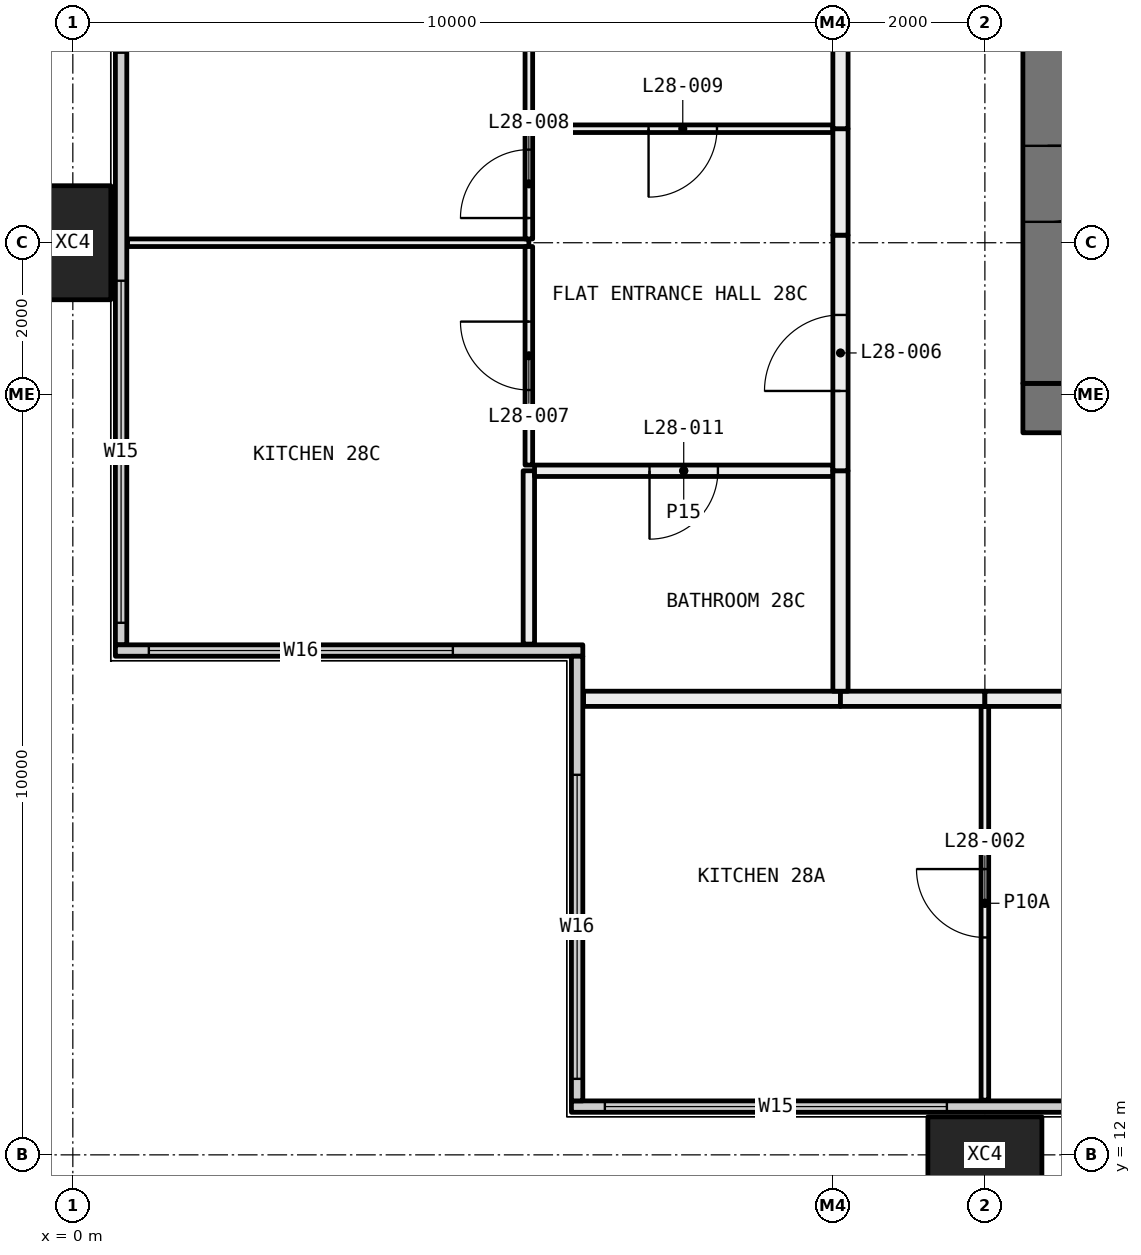
"""IFC4 building model, lengths in metres.
Left out: names, types, materials, properties, quantities, classifications, styles, units other than length and angle.
Written with IfcOpenShell. Run it as: python <this file> out.ifc"""

import sys

from ifc_helpers import new_model, si_unit, direction, frame, frame_2d, origin, origin_2d, place, context, subcontext, project, spatial, rectangle, hollow_rectangle, extrude, element, fill, save


model = new_model("IFC4")
c1 = context("Model", 3, precision=1e-05, world=origin(), true_north=direction((0.0, 1.0)))
c2 = subcontext(c1, "Body", "Model", "MODEL_VIEW")
j1 = project(units=[si_unit("LENGTHUNIT", "METRE"), si_unit("PLANEANGLEUNIT", "RADIAN")], contexts=[c1])
p1 = place(None, origin())
s1 = spatial("IfcSite", under=j1, at=p1, CompositionType="ELEMENT")
p2 = place(p1, origin())
s2 = spatial("IfcBuilding", under=s1, at=p2, CompositionType="ELEMENT")
p3 = place(p2, frame((0.0, 0.0, 110.4)))
s3 = spatial("IfcBuildingStorey", under=s2, at=p3, CompositionType="ELEMENT", Elevation=110.4)
for number, where, z_axis, x_axis in (
    (1, (0.0, 24.0, -0.4), (0.0, 0.0, 1.0), (0.0, 1.0, 0.0)),
    (2, (12.0, 12.0, -0.4), (0.0, 0.0, 1.0), (1.0, 0.0, 0.0)),
):
    element("IfcColumn", number, at=place(p3, frame(where, z_axis=z_axis, x_axis=x_axis)), inside=s3, PredefinedType="COLUMN", context=c2, shape_type="SweptSolid", body=[
        extrude(hollow_rectangle(XDim=1.5, YDim=1.0, WallThickness=0.06, at=origin_2d()), origin(), (0.0, 0.0, 1.0), 3.45),
    ])
p4 = place(p3, frame((6.56, 12.635, 0.0), z_axis=(0.0, 0.0, 1.0), x_axis=(1.0, 0.0, 0.0)))
e3 = element("IfcWall", 3, at=p4, inside=s3, PredefinedType="ELEMENTEDWALL", context=c2, shape_type="SweptSolid", body=[
    extrude(rectangle(XDim=58.88, YDim=0.15, at=frame_2d((29.44, 0.0))), origin(), (0.0, 0.0, 1.0), 3.05),
])
p5 = place(p4, frame((0.44, 0.0, 0.45)))
e4 = element("IfcOpeningElement", 4, at=p5, cuts=e3, PredefinedType="OPENING", context=c2, shape_type="SweptSolid", body=[
    extrude(rectangle(XDim=4.5, YDim=2.55, at=frame_2d((2.25, 1.275))), frame((0.0, 0.085, 0.0), z_axis=(0.0, -1.0, 0.0), x_axis=(1.0, 0.0, 0.0)), (0.0, 0.0, 1.0), 0.17),
])
p6 = place(p4, frame((7.94, 0.0, 0.45)))
e5 = element("IfcOpeningElement", 5, at=p6, cuts=e3, PredefinedType="OPENING", context=c2, shape_type="SweptSolid", body=[
    extrude(rectangle(XDim=3.0, YDim=2.55, at=frame_2d((1.5, 1.275))), frame((0.0, 0.085, 0.0), z_axis=(0.0, -1.0, 0.0), x_axis=(1.0, 0.0, 0.0)), (0.0, 0.0, 1.0), 0.17),
])
p7 = place(p4, frame((11.94, 0.0, 0.45)))
e6 = element("IfcOpeningElement", 6, at=p7, cuts=e3, PredefinedType="OPENING", context=c2, shape_type="SweptSolid", body=[
    extrude(rectangle(XDim=3.0, YDim=2.55, at=frame_2d((1.5, 1.275))), frame((0.0, 0.085, 0.0), z_axis=(0.0, -1.0, 0.0), x_axis=(1.0, 0.0, 0.0)), (0.0, 0.0, 1.0), 0.17),
])
p8 = place(p4, frame((19.94, 0.0, 0.45)))
e7 = element("IfcOpeningElement", 7, at=p8, cuts=e3, PredefinedType="OPENING", context=c2, shape_type="SweptSolid", body=[
    extrude(rectangle(XDim=3.0, YDim=2.55, at=frame_2d((1.5, 1.275))), frame((0.0, 0.085, 0.0), z_axis=(0.0, -1.0, 0.0), x_axis=(1.0, 0.0, 0.0)), (0.0, 0.0, 1.0), 0.17),
])
p9 = place(p4, frame((23.94, 0.0, 0.45)))
e8 = element("IfcOpeningElement", 8, at=p9, cuts=e3, PredefinedType="OPENING", context=c2, shape_type="SweptSolid", body=[
    extrude(rectangle(XDim=2.0, YDim=2.55, at=frame_2d((1.0, 1.275))), frame((0.0, 0.085, 0.0), z_axis=(0.0, -1.0, 0.0), x_axis=(1.0, 0.0, 0.0)), (0.0, 0.0, 1.0), 0.17),
])
p10 = place(p4, frame((31.94, 0.0, 0.45)))
e9 = element("IfcOpeningElement", 9, at=p10, cuts=e3, PredefinedType="OPENING", context=c2, shape_type="SweptSolid", body=[
    extrude(rectangle(XDim=3.0, YDim=2.55, at=frame_2d((1.5, 1.275))), frame((0.0, 0.085, 0.0), z_axis=(0.0, -1.0, 0.0), x_axis=(1.0, 0.0, 0.0)), (0.0, 0.0, 1.0), 0.17),
])
p11 = place(p4, frame((35.94, 0.0, 0.45)))
e10 = element("IfcOpeningElement", 10, at=p11, cuts=e3, PredefinedType="OPENING", context=c2, shape_type="SweptSolid", body=[
    extrude(rectangle(XDim=3.0, YDim=2.55, at=frame_2d((1.5, 1.275))), frame((0.0, 0.085, 0.0), z_axis=(0.0, -1.0, 0.0), x_axis=(1.0, 0.0, 0.0)), (0.0, 0.0, 1.0), 0.17),
])
p12 = place(p4, frame((43.94, 0.0, 0.45)))
e11 = element("IfcOpeningElement", 11, at=p12, cuts=e3, PredefinedType="OPENING", context=c2, shape_type="SweptSolid", body=[
    extrude(rectangle(XDim=3.0, YDim=2.55, at=frame_2d((1.5, 1.275))), frame((0.0, 0.085, 0.0), z_axis=(0.0, -1.0, 0.0), x_axis=(1.0, 0.0, 0.0)), (0.0, 0.0, 1.0), 0.17),
])
p13 = place(p4, frame((47.94, 0.0, 0.45)))
e12 = element("IfcOpeningElement", 12, at=p13, cuts=e3, PredefinedType="OPENING", context=c2, shape_type="SweptSolid", body=[
    extrude(rectangle(XDim=2.0, YDim=2.55, at=frame_2d((1.0, 1.275))), frame((0.0, 0.085, 0.0), z_axis=(0.0, -1.0, 0.0), x_axis=(1.0, 0.0, 0.0)), (0.0, 0.0, 1.0), 0.17),
])
p14 = place(p4, frame((53.94, 0.0, 0.45)))
e13 = element("IfcOpeningElement", 13, at=p14, cuts=e3, PredefinedType="OPENING", context=c2, shape_type="SweptSolid", body=[
    extrude(rectangle(XDim=4.5, YDim=2.55, at=frame_2d((2.25, 1.275))), frame((0.0, 0.085, 0.0), z_axis=(0.0, -1.0, 0.0), x_axis=(1.0, 0.0, 0.0)), (0.0, 0.0, 1.0), 0.17),
])
p15 = place(p3, frame((0.635, 18.71, 0.0), z_axis=(0.0, 0.0, 1.0), x_axis=(0.0, 1.0, 0.0)))
e14 = element("IfcWall", 14, at=p15, inside=s3, PredefinedType="ELEMENTEDWALL", context=c2, shape_type="SweptSolid", body=[
    extrude(rectangle(XDim=22.58, YDim=0.15, at=frame_2d((11.29, 0.0))), origin(), (0.0, 0.0, 1.0), 3.05),
])
p16 = place(p15, frame((0.29, 0.0, 0.45)))
e15 = element("IfcOpeningElement", 15, at=p16, cuts=e14, PredefinedType="OPENING", context=c2, shape_type="SweptSolid", body=[
    extrude(rectangle(XDim=4.5, YDim=2.55, at=frame_2d((2.25, 1.275))), frame((0.0, 0.085, 0.0), z_axis=(0.0, -1.0, 0.0), x_axis=(1.0, 0.0, 0.0)), (0.0, 0.0, 1.0), 0.17),
])
p17 = place(p15, frame((7.79, 0.0, 0.45)))
e16 = element("IfcOpeningElement", 16, at=p17, cuts=e14, PredefinedType="OPENING", context=c2, shape_type="SweptSolid", body=[
    extrude(rectangle(XDim=3.0, YDim=2.55, at=frame_2d((1.5, 1.275))), frame((0.0, 0.085, 0.0), z_axis=(0.0, -1.0, 0.0), x_axis=(1.0, 0.0, 0.0)), (0.0, 0.0, 1.0), 0.17),
])
p18 = place(p15, frame((11.79, 0.0, 0.45)))
e17 = element("IfcOpeningElement", 17, at=p18, cuts=e14, PredefinedType="OPENING", context=c2, shape_type="SweptSolid", body=[
    extrude(rectangle(XDim=2.0, YDim=2.55, at=frame_2d((1.0, 1.275))), frame((0.0, 0.085, 0.0), z_axis=(0.0, -1.0, 0.0), x_axis=(1.0, 0.0, 0.0)), (0.0, 0.0, 1.0), 0.17),
])
p19 = place(p15, frame((17.79, 0.0, 0.45)))
e18 = element("IfcOpeningElement", 18, at=p19, cuts=e14, PredefinedType="OPENING", context=c2, shape_type="SweptSolid", body=[
    extrude(rectangle(XDim=4.5, YDim=2.55, at=frame_2d((2.25, 1.275))), frame((0.0, 0.085, 0.0), z_axis=(0.0, -1.0, 0.0), x_axis=(1.0, 0.0, 0.0)), (0.0, 0.0, 1.0), 0.17),
])
p20 = place(p3, frame((0.56, 18.635, 0.0), z_axis=(0.0, 0.0, 1.0), x_axis=(1.0, 0.0, 0.0)))
e19 = element("IfcWall", 19, at=p20, inside=s3, PredefinedType="ELEMENTEDWALL", context=c2, shape_type="SweptSolid", body=[
    extrude(rectangle(XDim=6.15, YDim=0.15, at=frame_2d((3.075, 0.0))), origin(), (0.0, 0.0, 1.0), 3.05),
])
p21 = place(p20, frame((0.44, 0.0, 0.45)))
e20 = element("IfcOpeningElement", 20, at=p21, cuts=e19, PredefinedType="OPENING", context=c2, shape_type="SweptSolid", body=[
    extrude(rectangle(XDim=4.0, YDim=2.55, at=frame_2d((2.0, 1.275))), frame((0.0, 0.085, 0.0), z_axis=(0.0, -1.0, 0.0), x_axis=(1.0, 0.0, 0.0)), (0.0, 0.0, 1.0), 0.17),
])
p22 = place(p3, frame((6.635, 12.71, 0.0), z_axis=(0.0, 0.0, 1.0), x_axis=(0.0, 1.0, 0.0)))
e21 = element("IfcWall", 21, at=p22, inside=s3, PredefinedType="ELEMENTEDWALL", context=c2, shape_type="SweptSolid", body=[
    extrude(rectangle(XDim=5.85, YDim=0.15, at=frame_2d((2.925, 0.0))), origin(), (0.0, 0.0, 1.0), 3.05),
])
p23 = place(p22, frame((0.29, 0.0, 0.45)))
e22 = element("IfcOpeningElement", 22, at=p23, cuts=e21, PredefinedType="OPENING", context=c2, shape_type="SweptSolid", body=[
    extrude(rectangle(XDim=4.0, YDim=2.55, at=frame_2d((2.0, 1.275))), frame((0.0, 0.085, 0.0), z_axis=(0.0, -1.0, 0.0), x_axis=(1.0, 0.0, 0.0)), (0.0, 0.0, 1.0), 0.17),
])
p24 = place(p3, frame((12.0, 12.72, 0.0), z_axis=(0.0, 0.0, 1.0), x_axis=(0.0, 1.0, 0.0)))
e23 = element("IfcWall", 23, at=p24, inside=s3, PredefinedType="PARTITIONING", context=c2, shape_type="SweptSolid", body=[
    extrude(rectangle(XDim=5.18, YDim=0.1, at=frame_2d((2.59, 0.0))), origin(), (0.0, 0.0, 1.0), 3.05),
])
p25 = place(p24, frame((2.14, 0.0, 0.0)))
e24 = element("IfcOpeningElement", 24, at=p25, cuts=e23, PredefinedType="OPENING", context=c2, shape_type="SweptSolid", body=[
    extrude(rectangle(XDim=0.9, YDim=2.1, at=frame_2d((0.45, 1.05))), frame((0.0, 0.06, 0.0), z_axis=(0.0, -1.0, 0.0), x_axis=(1.0, 0.0, 0.0)), (0.0, 0.0, 1.0), 0.12),
])
p26 = place(p3, frame((10.1, 18.0, 0.0), z_axis=(0.0, 0.0, 1.0), x_axis=(-1.0, 0.0, 0.0)))
e25 = element("IfcWall", 25, at=p26, inside=s3, PredefinedType="PARTITIONING", context=c2, shape_type="SweptSolid", body=[
    extrude(rectangle(XDim=3.38, YDim=0.2, at=frame_2d((1.69, 0.0))), origin(), (0.0, 0.0, 1.0), 3.05),
])
p27 = place(p3, frame((12.0, 18.0, 0.0), z_axis=(0.0, 0.0, 1.0), x_axis=(-1.0, 0.0, 0.0)))
e26 = element("IfcWall", 26, at=p27, inside=s3, PredefinedType="PARTITIONING", context=c2, shape_type="SweptSolid", body=[
    extrude(rectangle(XDim=1.9, YDim=0.2, at=frame_2d((0.95, 0.0))), origin(), (0.0, 0.0, 1.0), 3.05),
])
p28 = place(p3, frame((18.0, 18.0, 0.0), z_axis=(0.0, 0.0, 1.0), x_axis=(-1.0, 0.0, 0.0)))
e27 = element("IfcWall", 27, at=p28, inside=s3, PredefinedType="PARTITIONING", context=c2, shape_type="SweptSolid", body=[
    extrude(rectangle(XDim=6.0, YDim=0.2, at=frame_2d((3.0, 0.0))), origin(), (0.0, 0.0, 1.0), 3.05),
])
p29 = place(p28, frame((2.5, 0.0, 0.0)))
e28 = element("IfcOpeningElement", 28, at=p29, cuts=e27, PredefinedType="OPENING", context=c2, shape_type="SweptSolid", body=[
    extrude(rectangle(XDim=1.0, YDim=2.1, at=frame_2d((0.5, 1.05))), frame((0.0, 0.11, 0.0), z_axis=(0.0, -1.0, 0.0), x_axis=(1.0, 0.0, 0.0)), (0.0, 0.0, 1.0), 0.22),
])
p30 = place(p3, frame((6.0, 24.0, 0.0), z_axis=(0.0, 0.0, 1.0), x_axis=(-1.0, 0.0, 0.0)))
e29 = element("IfcWall", 29, at=p30, inside=s3, PredefinedType="PARTITIONING", context=c2, shape_type="SweptSolid", body=[
    extrude(rectangle(XDim=5.28, YDim=0.1, at=frame_2d((2.64, 0.0))), origin(), (0.0, 0.0, 1.0), 2.45),
])
p31 = place(p3, frame((6.0, 18.72, 0.0), z_axis=(0.0, 0.0, 1.0), x_axis=(0.0, 1.0, 0.0)))
e30 = element("IfcWall", 30, at=p31, inside=s3, PredefinedType="PARTITIONING", context=c2, shape_type="SweptSolid", body=[
    extrude(rectangle(XDim=2.28, YDim=0.15, at=frame_2d((1.14, 0.0))), origin(), (0.0, 0.0, 1.0), 3.05),
])
p32 = place(p3, frame((6.0, 21.075, 0.0), z_axis=(0.0, 0.0, 1.0), x_axis=(0.0, 1.0, 0.0)))
e31 = element("IfcWall", 31, at=p32, inside=s3, PredefinedType="PARTITIONING", context=c2, shape_type="SweptSolid", body=[
    extrude(rectangle(XDim=2.875, YDim=0.1, at=frame_2d((1.438, 0.0))), origin(), (0.0, 0.0, 1.0), 2.45),
])
p33 = place(p32, frame((0.988, 0.0, 0.0)))
e32 = element("IfcOpeningElement", 32, at=p33, cuts=e31, PredefinedType="OPENING", context=c2, shape_type="SweptSolid", body=[
    extrude(rectangle(XDim=0.9, YDim=2.1, at=frame_2d((0.45, 1.05))), frame((0.0, 0.06, 0.0), z_axis=(0.0, -1.0, 0.0), x_axis=(1.0, 0.0, 0.0)), (0.0, 0.0, 1.0), 0.12),
])
p34 = place(p3, frame((6.0, 24.05, 0.0), z_axis=(0.0, 0.0, 1.0), x_axis=(0.0, 1.0, 0.0)))
e33 = element("IfcWall", 33, at=p34, inside=s3, PredefinedType="PARTITIONING", context=c2, shape_type="SweptSolid", body=[
    extrude(rectangle(XDim=1.45, YDim=0.1, at=frame_2d((0.725, 0.0))), origin(), (0.0, 0.0, 1.0), 2.45),
])
p35 = place(p34, frame((0.275, 0.0, 0.0)))
e34 = element("IfcOpeningElement", 34, at=p35, cuts=e33, PredefinedType="OPENING", context=c2, shape_type="SweptSolid", body=[
    extrude(rectangle(XDim=0.9, YDim=2.1, at=frame_2d((0.45, 1.05))), frame((0.0, 0.06, 0.0), z_axis=(0.0, -1.0, 0.0), x_axis=(1.0, 0.0, 0.0)), (0.0, 0.0, 1.0), 0.12),
])
p36 = place(p3, frame((6.0, 25.5, 0.0), z_axis=(0.0, 0.0, 1.0), x_axis=(0.0, 1.0, 0.0)))
e35 = element("IfcWall", 35, at=p36, inside=s3, PredefinedType="PARTITIONING", context=c2, shape_type="SweptSolid", body=[
    extrude(rectangle(XDim=10.45, YDim=0.1, at=frame_2d((5.225, 0.0))), origin(), (0.0, 0.0, 1.0), 2.45),
])
p37 = place(p3, frame((10.0, 21.0, 0.0), z_axis=(0.0, 0.0, 1.0), x_axis=(-1.0, 0.0, 0.0)))
e36 = element("IfcWall", 36, at=p37, inside=s3, PredefinedType="PARTITIONING", context=c2, shape_type="SweptSolid", body=[
    extrude(rectangle(XDim=3.925, YDim=0.15, at=frame_2d((1.962, 0.0))), origin(), (0.0, 0.0, 1.0), 3.05),
])
p38 = place(p37, frame((1.512, 0.0, 0.0)))
e37 = element("IfcOpeningElement", 37, at=p38, cuts=e36, PredefinedType="OPENING", context=c2, shape_type="SweptSolid", body=[
    extrude(rectangle(XDim=0.9, YDim=2.1, at=frame_2d((0.45, 1.05))), frame((0.0, 0.085, 0.0), z_axis=(0.0, -1.0, 0.0), x_axis=(1.0, 0.0, 0.0)), (0.0, 0.0, 1.0), 0.17),
])
p39 = place(p3, frame((10.1, 18.1, 0.0), z_axis=(0.0, 0.0, 1.0), x_axis=(0.0, 1.0, 0.0)))
e38 = element("IfcWall", 38, at=p39, inside=s3, PredefinedType="PARTITIONING", context=c2, shape_type="SweptSolid", body=[
    extrude(rectangle(XDim=2.9, YDim=0.2, at=frame_2d((1.45, 0.0))), origin(), (0.0, 0.0, 1.0), 3.05),
])
p40 = place(p3, frame((10.0, 25.5, 0.0), z_axis=(0.0, 0.0, 1.0), x_axis=(-1.0, 0.0, 0.0)))
e39 = element("IfcWall", 39, at=p40, inside=s3, PredefinedType="PARTITIONING", context=c2, shape_type="SweptSolid", body=[
    extrude(rectangle(XDim=3.95, YDim=0.1, at=frame_2d((1.975, 0.0))), origin(), (0.0, 0.0, 1.0), 3.05),
])
p41 = place(p40, frame((1.525, 0.0, 0.0)))
e40 = element("IfcOpeningElement", 40, at=p41, cuts=e39, PredefinedType="OPENING", context=c2, shape_type="SweptSolid", body=[
    extrude(rectangle(XDim=0.9, YDim=2.1, at=frame_2d((0.45, 1.05))), frame((0.0, 0.06, 0.0), z_axis=(0.0, -1.0, 0.0), x_axis=(1.0, 0.0, 0.0)), (0.0, 0.0, 1.0), 0.12),
])
p42 = place(p3, frame((10.1, 21.0, 0.0), z_axis=(0.0, 0.0, 1.0), x_axis=(0.0, 1.0, 0.0)))
e41 = element("IfcWall", 41, at=p42, inside=s3, PredefinedType="PARTITIONING", context=c2, shape_type="SweptSolid", body=[
    extrude(rectangle(XDim=3.1, YDim=0.2, at=frame_2d((1.55, 0.0))), origin(), (0.0, 0.0, 1.0), 2.45),
])
p43 = place(p42, frame((1.05, 0.0, 0.0)))
e42 = element("IfcOpeningElement", 42, at=p43, cuts=e41, PredefinedType="OPENING", context=c2, shape_type="SweptSolid", body=[
    extrude(rectangle(XDim=1.0, YDim=2.1, at=frame_2d((0.5, 1.05))), frame((0.0, 0.11, 0.0), z_axis=(0.0, -1.0, 0.0), x_axis=(1.0, 0.0, 0.0)), (0.0, 0.0, 1.0), 0.22),
])
p44 = place(p3, frame((10.1, 24.1, 0.0), z_axis=(0.0, 0.0, 1.0), x_axis=(0.0, 1.0, 0.0)))
e43 = element("IfcWall", 43, at=p44, inside=s3, PredefinedType="PARTITIONING", context=c2, shape_type="SweptSolid", body=[
    extrude(rectangle(XDim=1.4, YDim=0.2, at=frame_2d((0.7, 0.0))), origin(), (0.0, 0.0, 1.0), 3.05),
])
p45 = place(p3, frame((10.1, 25.5, 0.0), z_axis=(0.0, 0.0, 1.0), x_axis=(0.0, 1.0, 0.0)))
e44 = element("IfcWall", 44, at=p45, inside=s3, PredefinedType="PARTITIONING", context=c2, shape_type="SweptSolid", body=[
    extrude(rectangle(XDim=10.6, YDim=0.2, at=frame_2d((5.3, 0.0))), origin(), (0.0, 0.0, 1.0), 2.45),
])
p46 = place(p3, frame((12.5, 21.825, 0.0), z_axis=(0.0, 0.0, 1.0), x_axis=(1.0, 0.0, 0.0)))
e45 = element("IfcWall", 45, at=p46, inside=s3, PredefinedType="SHEAR", context=c2, shape_type="SweptSolid", body=[
    extrude(rectangle(XDim=11.0, YDim=0.65, at=frame_2d((5.5, 0.0))), origin(), (0.0, 0.0, 1.0), 3.05),
])
p47 = place(p3, frame((12.825, 22.15, 0.0), z_axis=(0.0, 0.0, 1.0), x_axis=(0.0, 1.0, 0.0)))
e46 = element("IfcWall", 46, at=p47, inside=s3, PredefinedType="SHEAR", context=c2, shape_type="SweptSolid", body=[
    extrude(rectangle(XDim=15.7, YDim=0.65, at=frame_2d((7.85, 0.0))), origin(), (0.0, 0.0, 1.0), 3.05),
])
p48 = place(p47, frame((8.3, 0.0, 0.0)))
e47 = element("IfcOpeningElement", 47, at=p48, cuts=e46, PredefinedType="OPENING", context=c2, shape_type="SweptSolid", body=[
    extrude(rectangle(XDim=1.6, YDim=2.1, at=frame_2d((0.8, 1.05))), frame((0.0, 0.335, 0.0), z_axis=(0.0, -1.0, 0.0), x_axis=(1.0, 0.0, 0.0)), (0.0, 0.0, 1.0), 0.67),
])
p49 = place(p47, frame((2.125, 0.0, 0.0)))
e48 = element("IfcOpeningElement", 48, at=p49, cuts=e46, PredefinedType="OPENING", context=c2, shape_type="SweptSolid", body=[
    extrude(rectangle(XDim=1.0, YDim=2.1, at=frame_2d((0.5, 1.05))), frame((0.0, 0.335, 0.0), z_axis=(0.0, -1.0, 0.0), x_axis=(1.0, 0.0, 0.0)), (0.0, 0.0, 1.0), 0.67),
])
p50 = place(p5, origin())
e49 = element("IfcWindow", 49, at=p50, inside=s3, PartitioningType="SINGLE_PANEL", PredefinedType="WINDOW", context=c2, shape_type="SweptSolid", body=[
    extrude(rectangle(XDim=4.5, YDim=2.55, at=frame_2d((2.25, 1.275))), frame((0.0, 0.03, 0.0), z_axis=(0.0, -1.0, 0.0), x_axis=(1.0, 0.0, 0.0)), (0.0, 0.0, 1.0), 0.06),
])
fill(e4, e49)
p51 = place(p16, origin())
e50 = element("IfcWindow", 50, at=p51, inside=s3, PartitioningType="SINGLE_PANEL", PredefinedType="WINDOW", context=c2, shape_type="SweptSolid", body=[
    extrude(rectangle(XDim=4.5, YDim=2.55, at=frame_2d((2.25, 1.275))), frame((0.0, 0.03, 0.0), z_axis=(0.0, -1.0, 0.0), x_axis=(1.0, 0.0, 0.0)), (0.0, 0.0, 1.0), 0.06),
])
fill(e15, e50)
p52 = place(p21, origin())
e51 = element("IfcWindow", 51, at=p52, inside=s3, PartitioningType="SINGLE_PANEL", PredefinedType="WINDOW", context=c2, shape_type="SweptSolid", body=[
    extrude(rectangle(XDim=4.0, YDim=2.55, at=frame_2d((2.0, 1.275))), frame((0.0, 0.03, 0.0), z_axis=(0.0, -1.0, 0.0), x_axis=(1.0, 0.0, 0.0)), (0.0, 0.0, 1.0), 0.06),
])
fill(e20, e51)
p53 = place(p23, origin())
e52 = element("IfcWindow", 52, at=p53, inside=s3, PartitioningType="SINGLE_PANEL", PredefinedType="WINDOW", context=c2, shape_type="SweptSolid", body=[
    extrude(rectangle(XDim=4.0, YDim=2.55, at=frame_2d((2.0, 1.275))), frame((0.0, 0.03, 0.0), z_axis=(0.0, -1.0, 0.0), x_axis=(1.0, 0.0, 0.0)), (0.0, 0.0, 1.0), 0.06),
])
fill(e22, e52)
p54 = place(p25, origin())
e53 = element("IfcDoor", 53, at=p54, inside=s3, OperationType="SINGLE_SWING_LEFT", PredefinedType="DOOR", context=c2, shape_type="SweptSolid", body=[
    extrude(rectangle(XDim=0.9, YDim=2.1, at=frame_2d((0.45, 1.05))), frame((0.0, 0.025, 0.0), z_axis=(0.0, -1.0, 0.0), x_axis=(1.0, 0.0, 0.0)), (0.0, 0.0, 1.0), 0.05),
])
fill(e24, e53)
p55 = place(p43, origin())
e54 = element("IfcDoor", 54, at=p55, inside=s3, OperationType="SINGLE_SWING_RIGHT", PredefinedType="DOOR", context=c2, shape_type="SweptSolid", body=[
    extrude(rectangle(XDim=1.0, YDim=2.1, at=frame_2d((0.5, 1.05))), frame((0.0, 0.025, 0.0), z_axis=(0.0, -1.0, 0.0), x_axis=(1.0, 0.0, 0.0)), (0.0, 0.0, 1.0), 0.05),
])
fill(e42, e54)
p56 = place(p33, origin())
e55 = element("IfcDoor", 55, at=p56, inside=s3, OperationType="SINGLE_SWING_LEFT", PredefinedType="DOOR", context=c2, shape_type="SweptSolid", body=[
    extrude(rectangle(XDim=0.9, YDim=2.1, at=frame_2d((0.45, 1.05))), frame((0.0, 0.025, 0.0), z_axis=(0.0, -1.0, 0.0), x_axis=(1.0, 0.0, 0.0)), (0.0, 0.0, 1.0), 0.05),
])
fill(e32, e55)
p57 = place(p35, origin())
e56 = element("IfcDoor", 56, at=p57, inside=s3, OperationType="SINGLE_SWING_RIGHT", PredefinedType="DOOR", context=c2, shape_type="SweptSolid", body=[
    extrude(rectangle(XDim=0.9, YDim=2.1, at=frame_2d((0.45, 1.05))), frame((0.0, 0.025, 0.0), z_axis=(0.0, -1.0, 0.0), x_axis=(1.0, 0.0, 0.0)), (0.0, 0.0, 1.0), 0.05),
])
fill(e34, e56)
p58 = place(p41, origin())
e57 = element("IfcDoor", 57, at=p58, inside=s3, OperationType="SINGLE_SWING_LEFT", PredefinedType="DOOR", context=c2, shape_type="SweptSolid", body=[
    extrude(rectangle(XDim=0.9, YDim=2.1, at=frame_2d((0.45, 1.05))), frame((0.0, 0.025, 0.0), z_axis=(0.0, -1.0, 0.0), x_axis=(1.0, 0.0, 0.0)), (0.0, 0.0, 1.0), 0.05),
])
fill(e40, e57)
p59 = place(p38, origin())
e58 = element("IfcDoor", 58, at=p59, inside=s3, OperationType="SINGLE_SWING_LEFT", PredefinedType="DOOR", context=c2, shape_type="SweptSolid", body=[
    extrude(rectangle(XDim=0.9, YDim=2.1, at=frame_2d((0.45, 1.05))), frame((0.0, 0.025, 0.0), z_axis=(0.0, -1.0, 0.0), x_axis=(1.0, 0.0, 0.0)), (0.0, 0.0, 1.0), 0.05),
])
fill(e37, e58)
p60 = place(p49, frame((1.0, 0.0, 0.0), x_axis=(-1.0, 0.0, 0.0)))
e59 = element("IfcDoor", 59, at=p60, inside=s3, OperationType="SINGLE_SWING_RIGHT", PredefinedType="DOOR", context=c2, shape_type="SweptSolid", body=[
    extrude(rectangle(XDim=1.0, YDim=2.1, at=frame_2d((0.5, 1.05))), frame((0.0, 0.025, 0.0), z_axis=(0.0, -1.0, 0.0), x_axis=(1.0, 0.0, 0.0)), (0.0, 0.0, 1.0), 0.05),
])
fill(e48, e59)
save(model, sys.argv[1])
